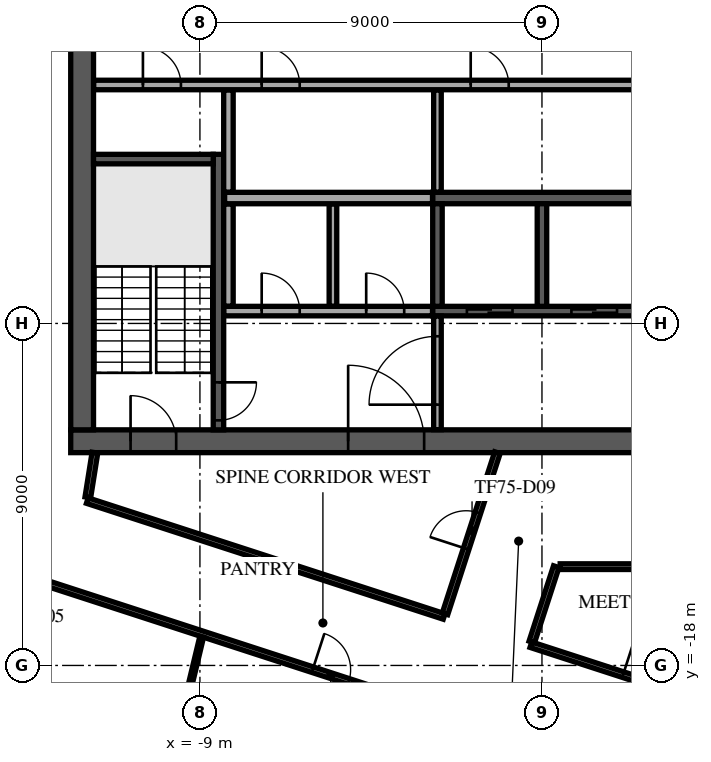
"""IFC4 building model, lengths in metres.
Left out: names, types, materials, properties, quantities, classifications, styles, units other than length and angle.
Written with IfcOpenShell. Run it as: python <this file> out.ifc"""

import sys

from ifc_helpers import new_model, si_unit, direction, frame, frame_2d, origin, place, context, subcontext, project, spatial, rectangle, extrude, element, fill, save


model = new_model("IFC4")
c1 = context("Model", 3, precision=1e-05, world=origin(), true_north=direction((0.0, 1.0)))
c2 = subcontext(c1, "Body", "Model", "MODEL_VIEW")
j1 = project(units=[si_unit("LENGTHUNIT", "METRE"), si_unit("PLANEANGLEUNIT", "RADIAN")], contexts=[c1])
p1 = place(None, origin())
s1 = spatial("IfcSite", under=j1, at=p1, CompositionType="ELEMENT")
p2 = place(p1, origin())
s2 = spatial("IfcBuilding", under=s1, at=p2, CompositionType="ELEMENT")
p3 = place(p2, frame((0.0, 0.0, 316.5)))
s3 = spatial("IfcBuildingStorey", under=s2, at=p3, CompositionType="ELEMENT", Elevation=316.5)
p4 = place(p3, frame((-12.4, -12.1, 0.0), z_axis=(0.0, 0.0, 1.0), x_axis=(1.0, 0.0, 0.0)))
e1 = element("IfcWall", 1, at=p4, inside=s3, PredefinedType="SHEAR", context=c2, shape_type="SweptSolid", body=[
    extrude(rectangle(XDim=24.8, YDim=0.6, at=frame_2d((12.4, 0.0))), origin(), (0.0, 0.0, 1.0), 3.65),
])
p5 = place(p4, frame((7.3, 0.0, 0.0)))
e2 = element("IfcOpeningElement", 2, at=p5, cuts=e1, PredefinedType="OPENING", context=c2, shape_type="SweptSolid", body=[
    extrude(rectangle(XDim=2.0, YDim=2.1, at=frame_2d((1.0, 1.05))), frame((0.0, 0.31, 0.0), z_axis=(0.0, -1.0, 0.0), x_axis=(1.0, 0.0, 0.0)), (0.0, 0.0, 1.0), 0.62),
])
p6 = place(p4, frame((17.425, 0.0, 0.0)))
e3 = element("IfcOpeningElement", 3, at=p6, cuts=e1, PredefinedType="OPENING", context=c2, shape_type="SweptSolid", body=[
    extrude(rectangle(XDim=1.2, YDim=2.1, at=frame_2d((0.6, 1.05))), frame((0.0, 0.31, 0.0), z_axis=(0.0, -1.0, 0.0), x_axis=(1.0, 0.0, 0.0)), (0.0, 0.0, 1.0), 0.62),
])
p7 = place(p4, frame((1.575, 0.0, 0.0)))
e4 = element("IfcOpeningElement", 4, at=p7, cuts=e1, PredefinedType="OPENING", context=c2, shape_type="SweptSolid", body=[
    extrude(rectangle(XDim=1.2, YDim=2.1, at=frame_2d((0.6, 1.05))), frame((0.0, 0.31, 0.0), z_axis=(0.0, -1.0, 0.0), x_axis=(1.0, 0.0, 0.0)), (0.0, 0.0, 1.0), 0.62),
])
p8 = place(p4, frame((22.025, 0.0, 0.0)))
e5 = element("IfcOpeningElement", 5, at=p8, cuts=e1, PredefinedType="OPENING", context=c2, shape_type="SweptSolid", body=[
    extrude(rectangle(XDim=1.2, YDim=2.1, at=frame_2d((0.6, 1.05))), frame((0.0, 0.31, 0.0), z_axis=(0.0, -1.0, 0.0), x_axis=(1.0, 0.0, 0.0)), (0.0, 0.0, 1.0), 0.62),
])
p9 = place(p3, frame((-12.1, -11.8, 0.0), z_axis=(0.0, 0.0, 1.0), x_axis=(0.0, 1.0, 0.0)))
e6 = element("IfcWall", 6, at=p9, inside=s3, PredefinedType="SHEAR", context=c2, shape_type="SweptSolid", body=[
    extrude(rectangle(XDim=23.6, YDim=0.6, at=frame_2d((11.8, 0.0))), origin(), (0.0, 0.0, 1.0), 3.65),
])
p10 = place(p9, frame((10.6, 0.0, 0.0)))
e7 = element("IfcOpeningElement", 7, at=p10, cuts=e6, PredefinedType="OPENING", context=c2, shape_type="SweptSolid", body=[
    extrude(rectangle(XDim=2.4, YDim=2.4, at=frame_2d((1.2, 1.2))), frame((0.0, 0.31, 0.0), z_axis=(0.0, -1.0, 0.0), x_axis=(1.0, 0.0, 0.0)), (0.0, 0.0, 1.0), 0.62),
])
p11 = place(p3, frame((-2.875, -5.7, 0.0), z_axis=(0.0, 0.0, 1.0), x_axis=(1.0, 0.0, 0.0)))
e8 = element("IfcWall", 8, at=p11, inside=s3, PredefinedType="SOLIDWALL", context=c2, shape_type="SweptSolid", body=[
    extrude(rectangle(XDim=11.25, YDim=0.3, at=frame_2d((5.625, 0.0))), origin(), (0.0, 0.0, 1.0), 3.65),
])
p12 = place(p3, frame((-2.875, -8.675, 0.0), z_axis=(0.0, 0.0, 1.0), x_axis=(1.0, 0.0, 0.0)))
e9 = element("IfcWall", 9, at=p12, inside=s3, PredefinedType="SOLIDWALL", context=c2, shape_type="SweptSolid", body=[
    extrude(rectangle(XDim=11.25, YDim=0.25, at=frame_2d((5.625, 0.0))), origin(), (0.0, 0.0, 1.0), 3.65),
])
p13 = place(p12, frame((0.9, 0.0, 0.0)))
e10 = element("IfcOpeningElement", 10, at=p13, cuts=e9, PredefinedType="OPENING", context=c2, shape_type="SweptSolid", body=[
    extrude(rectangle(XDim=1.2, YDim=2.1, at=frame_2d((0.6, 1.05))), frame((0.0, 0.135, 0.0), z_axis=(0.0, -1.0, 0.0), x_axis=(1.0, 0.0, 0.0)), (0.0, 0.0, 1.0), 0.27),
])
p14 = place(p12, frame((3.65, 0.0, 0.0)))
e11 = element("IfcOpeningElement", 11, at=p14, cuts=e9, PredefinedType="OPENING", context=c2, shape_type="SweptSolid", body=[
    extrude(rectangle(XDim=1.2, YDim=2.1, at=frame_2d((0.6, 1.05))), frame((0.0, 0.135, 0.0), z_axis=(0.0, -1.0, 0.0), x_axis=(1.0, 0.0, 0.0)), (0.0, 0.0, 1.0), 0.27),
])
p15 = place(p12, frame((6.4, 0.0, 0.0)))
e12 = element("IfcOpeningElement", 12, at=p15, cuts=e9, PredefinedType="OPENING", context=c2, shape_type="SweptSolid", body=[
    extrude(rectangle(XDim=1.2, YDim=2.1, at=frame_2d((0.6, 1.05))), frame((0.0, 0.135, 0.0), z_axis=(0.0, -1.0, 0.0), x_axis=(1.0, 0.0, 0.0)), (0.0, 0.0, 1.0), 0.27),
])
p16 = place(p12, frame((9.15, 0.0, 0.0)))
e13 = element("IfcOpeningElement", 13, at=p16, cuts=e9, PredefinedType="OPENING", context=c2, shape_type="SweptSolid", body=[
    extrude(rectangle(XDim=1.2, YDim=2.1, at=frame_2d((0.6, 1.05))), frame((0.0, 0.135, 0.0), z_axis=(0.0, -1.0, 0.0), x_axis=(1.0, 0.0, 0.0)), (0.0, 0.0, 1.0), 0.27),
])
for number, where, z_axis, x_axis in (
    (14, (-2.75, -8.55, 0.0), (0.0, 0.0, 1.0), (0.0, 1.0, 0.0)),
    (15, (0.0, -8.55, 0.0), (0.0, 0.0, 1.0), (0.0, 1.0, 0.0)),
):
    element("IfcWall", number, at=place(p3, frame(where, z_axis=z_axis, x_axis=x_axis)), inside=s3, PredefinedType="SOLIDWALL", context=c2, shape_type="SweptSolid", body=[
        extrude(rectangle(XDim=2.7, YDim=0.25, at=frame_2d((1.35, 0.0))), origin(), (0.0, 0.0, 1.0), 3.65),
    ])
p17 = place(p3, frame((-8.512, -4.55, 0.0), z_axis=(0.0, 0.0, 1.0), x_axis=(0.0, -1.0, 0.0)))
e16 = element("IfcWall", 16, at=p17, inside=s3, PredefinedType="SOLIDWALL", context=c2, shape_type="SweptSolid", body=[
    extrude(rectangle(XDim=7.25, YDim=0.275, at=frame_2d((3.625, 0.0))), origin(), (0.0, 0.0, 1.0), 3.65),
])
p18 = place(p17, frame((6.0, 0.0, 0.0)))
e17 = element("IfcOpeningElement", 17, at=p18, cuts=e16, PredefinedType="OPENING", context=c2, shape_type="SweptSolid", body=[
    extrude(rectangle(XDim=1.0, YDim=2.1, at=frame_2d((0.5, 1.05))), frame((0.0, 0.147, 0.0), z_axis=(0.0, -1.0, 0.0), x_axis=(1.0, 0.0, 0.0)), (0.0, 0.0, 1.0), 0.295),
])
p19 = place(p3, frame((-8.65, -4.675, 0.0), z_axis=(0.0, 0.0, 1.0), x_axis=(-1.0, 0.0, 0.0)))
e18 = element("IfcWall", 18, at=p19, inside=s3, PredefinedType="SOLIDWALL", context=c2, shape_type="SweptSolid", body=[
    extrude(rectangle(XDim=3.15, YDim=0.25, at=frame_2d((1.575, 0.0))), origin(), (0.0, 0.0, 1.0), 3.65),
])
p20 = place(p3, frame((-2.75, -11.795, 0.0), z_axis=(0.0, 0.0, 1.0), x_axis=(0.0, 1.0, 0.0)))
e19 = element("IfcWall", 19, at=p20, inside=s3, PredefinedType="PARTITIONING", context=c2, shape_type="SweptSolid", body=[
    extrude(rectangle(XDim=2.99, YDim=0.2, at=frame_2d((1.495, 0.0))), origin(), (0.0, 0.0, 1.0), 3.65),
])
p21 = place(p20, frame((0.657, 0.0, 0.0)))
e20 = element("IfcOpeningElement", 20, at=p21, cuts=e19, PredefinedType="OPENING", context=c2, shape_type="SweptSolid", body=[
    extrude(rectangle(XDim=1.8, YDim=2.1, at=frame_2d((0.9, 1.05))), frame((0.0, 0.11, 0.0), z_axis=(0.0, -1.0, 0.0), x_axis=(1.0, 0.0, 0.0)), (0.0, 0.0, 1.0), 0.22),
])
p22 = place(p3, frame((-8.37, -8.675, 0.0), z_axis=(0.0, 0.0, 1.0), x_axis=(1.0, 0.0, 0.0)))
e21 = element("IfcWall", 21, at=p22, inside=s3, PredefinedType="PARTITIONING", context=c2, shape_type="SweptSolid", body=[
    extrude(rectangle(XDim=5.49, YDim=0.25, at=frame_2d((2.745, 0.0))), origin(), (0.0, 0.0, 1.0), 3.65),
])
p23 = place(p22, frame((0.995, 0.0, 0.0)))
e22 = element("IfcOpeningElement", 22, at=p23, cuts=e21, PredefinedType="OPENING", context=c2, shape_type="SweptSolid", body=[
    extrude(rectangle(XDim=1.0, YDim=2.1, at=frame_2d((0.5, 1.05))), frame((0.0, 0.135, 0.0), z_axis=(0.0, -1.0, 0.0), x_axis=(1.0, 0.0, 0.0)), (0.0, 0.0, 1.0), 0.27),
])
p24 = place(p22, frame((3.745, 0.0, 0.0)))
e23 = element("IfcOpeningElement", 23, at=p24, cuts=e21, PredefinedType="OPENING", context=c2, shape_type="SweptSolid", body=[
    extrude(rectangle(XDim=1.0, YDim=2.1, at=frame_2d((0.5, 1.05))), frame((0.0, 0.135, 0.0), z_axis=(0.0, -1.0, 0.0), x_axis=(1.0, 0.0, 0.0)), (0.0, 0.0, 1.0), 0.27),
])
p25 = place(p3, frame((-8.25, -8.545, 0.0), z_axis=(0.0, 0.0, 1.0), x_axis=(0.0, 1.0, 0.0)))
e24 = element("IfcWall", 24, at=p25, inside=s3, PredefinedType="PARTITIONING", context=c2, shape_type="SweptSolid", body=[
    extrude(rectangle(XDim=2.69, YDim=0.25, at=frame_2d((1.345, 0.0))), origin(), (0.0, 0.0, 1.0), 3.65),
])
p26 = place(p3, frame((-5.5, -8.545, 0.0), z_axis=(0.0, 0.0, 1.0), x_axis=(0.0, 1.0, 0.0)))
e25 = element("IfcWall", 25, at=p26, inside=s3, PredefinedType="PARTITIONING", context=c2, shape_type="SweptSolid", body=[
    extrude(rectangle(XDim=2.69, YDim=0.2, at=frame_2d((1.345, 0.0))), origin(), (0.0, 0.0, 1.0), 3.65),
])
p27 = place(p3, frame((-8.35, -5.7, 0.0), z_axis=(0.0, 0.0, 1.0), x_axis=(1.0, 0.0, 0.0)))
e26 = element("IfcWall", 26, at=p27, inside=s3, PredefinedType="PARTITIONING", context=c2, shape_type="SweptSolid", body=[
    extrude(rectangle(XDim=5.47, YDim=0.3, at=frame_2d((2.735, 0.0))), origin(), (0.0, 0.0, 1.0), 3.65),
])
p28 = place(p3, frame((-8.25, -5.545, 0.0), z_axis=(0.0, 0.0, 1.0), x_axis=(0.0, 1.0, 0.0)))
e27 = element("IfcWall", 27, at=p28, inside=s3, PredefinedType="PARTITIONING", context=c2, shape_type="SweptSolid", body=[
    extrude(rectangle(XDim=2.69, YDim=0.25, at=frame_2d((1.345, 0.0))), origin(), (0.0, 0.0, 1.0), 3.65),
])
p29 = place(p3, frame((-2.75, -5.545, 0.0), z_axis=(0.0, 0.0, 1.0), x_axis=(0.0, 1.0, 0.0)))
e28 = element("IfcWall", 28, at=p29, inside=s3, PredefinedType="PARTITIONING", context=c2, shape_type="SweptSolid", body=[
    extrude(rectangle(XDim=2.69, YDim=0.2, at=frame_2d((1.345, 0.0))), origin(), (0.0, 0.0, 1.0), 3.65),
])
p30 = place(p3, frame((-11.795, -2.725, 0.0), z_axis=(0.0, 0.0, 1.0), x_axis=(1.0, 0.0, 0.0)))
e29 = element("IfcWall", 29, at=p30, inside=s3, PredefinedType="PARTITIONING", context=c2, shape_type="SweptSolid", body=[
    extrude(rectangle(XDim=14.415, YDim=0.25, at=frame_2d((7.208, 0.0))), origin(), (0.0, 0.0, 1.0), 3.65),
])
p31 = place(p30, frame((1.295, 0.0, 0.0)))
e30 = element("IfcOpeningElement", 30, at=p31, cuts=e29, PredefinedType="OPENING", context=c2, shape_type="SweptSolid", body=[
    extrude(rectangle(XDim=1.0, YDim=2.1, at=frame_2d((0.5, 1.05))), frame((0.0, 0.135, 0.0), z_axis=(0.0, -1.0, 0.0), x_axis=(1.0, 0.0, 0.0)), (0.0, 0.0, 1.0), 0.27),
])
p32 = place(p30, frame((4.42, 0.0, 0.0)))
e31 = element("IfcOpeningElement", 31, at=p32, cuts=e29, PredefinedType="OPENING", context=c2, shape_type="SweptSolid", body=[
    extrude(rectangle(XDim=1.0, YDim=2.1, at=frame_2d((0.5, 1.05))), frame((0.0, 0.135, 0.0), z_axis=(0.0, -1.0, 0.0), x_axis=(1.0, 0.0, 0.0)), (0.0, 0.0, 1.0), 0.27),
])
p33 = place(p30, frame((9.92, 0.0, 0.0)))
e32 = element("IfcOpeningElement", 32, at=p33, cuts=e29, PredefinedType="OPENING", context=c2, shape_type="SweptSolid", body=[
    extrude(rectangle(XDim=1.0, YDim=2.1, at=frame_2d((0.5, 1.05))), frame((0.0, 0.135, 0.0), z_axis=(0.0, -1.0, 0.0), x_axis=(1.0, 0.0, 0.0)), (0.0, 0.0, 1.0), 0.27),
])
p34 = place(p3, frame((-22.763, -12.676, 0.0), z_axis=(0.0, 0.0, 1.0), x_axis=(0.951055018443, -0.309021604252, 0.0)))
e33 = element("IfcWall", 33, at=p34, inside=s3, PredefinedType="PARTITIONING", context=c2, shape_type="SweptSolid", body=[
    extrude(rectangle(XDim=35.537, YDim=0.15, at=frame_2d((17.769, 0.0))), origin(), (0.0, 0.0, 1.0), 3.25),
])
p35 = place(p34, frame((0.8, 0.0, 0.0)))
e34 = element("IfcOpeningElement", 34, at=p35, cuts=e33, PredefinedType="OPENING", context=c2, shape_type="SweptSolid", body=[
    extrude(rectangle(XDim=1.8, YDim=2.1, at=frame_2d((0.9, 1.05))), frame((0.0, 0.085, 0.0), z_axis=(0.0, -1.0, 0.0), x_axis=(1.0, 0.0, 0.0)), (0.0, 0.0, 1.0), 0.17),
])
p36 = place(p34, frame((9.098, 0.0, 0.0)))
e35 = element("IfcOpeningElement", 35, at=p36, cuts=e33, PredefinedType="OPENING", context=c2, shape_type="SweptSolid", body=[
    extrude(rectangle(XDim=1.0, YDim=2.1, at=frame_2d((0.5, 1.05))), frame((0.0, 0.085, 0.0), z_axis=(0.0, -1.0, 0.0), x_axis=(1.0, 0.0, 0.0)), (0.0, 0.0, 1.0), 0.17),
])
p37 = place(p34, frame((17.589, 0.0, 0.0)))
e36 = element("IfcOpeningElement", 36, at=p37, cuts=e33, PredefinedType="OPENING", context=c2, shape_type="SweptSolid", body=[
    extrude(rectangle(XDim=1.0, YDim=2.1, at=frame_2d((0.5, 1.05))), frame((0.0, 0.085, 0.0), z_axis=(0.0, -1.0, 0.0), x_axis=(1.0, 0.0, 0.0)), (0.0, 0.0, 1.0), 0.17),
])
p38 = place(p34, frame((27.473, 0.0, 0.0)))
e37 = element("IfcOpeningElement", 37, at=p38, cuts=e33, PredefinedType="OPENING", context=c2, shape_type="SweptSolid", body=[
    extrude(rectangle(XDim=1.0, YDim=2.1, at=frame_2d((0.5, 1.05))), frame((0.0, 0.085, 0.0), z_axis=(0.0, -1.0, 0.0), x_axis=(1.0, 0.0, 0.0)), (0.0, 0.0, 1.0), 0.17),
])
p39 = place(p34, frame((30.83, 0.0, 0.0)))
e38 = element("IfcOpeningElement", 38, at=p39, cuts=e33, PredefinedType="OPENING", context=c2, shape_type="SweptSolid", body=[
    extrude(rectangle(XDim=1.8, YDim=2.1, at=frame_2d((0.9, 1.05))), frame((0.0, 0.085, 0.0), z_axis=(0.0, -1.0, 0.0), x_axis=(1.0, 0.0, 0.0)), (0.0, 0.0, 1.0), 0.17),
])
p40 = place(p3, frame((-11.963, -13.662, 0.0), z_axis=(0.0, 0.0, 1.0), x_axis=(0.951081492471, -0.308940115036, 0.0)))
e39 = element("IfcWall", 39, at=p40, inside=s3, PredefinedType="PARTITIONING", context=c2, shape_type="SweptSolid", body=[
    extrude(rectangle(XDim=9.872, YDim=0.15, at=frame_2d((4.936, 0.0))), origin(), (0.0, 0.0, 1.0), 3.25),
])
p41 = place(p3, frame((-11.949, -13.575, 0.0), z_axis=(0.0, 0.0, 1.0), x_axis=(0.156542003239, 0.987671302216, 0.0)))
e40 = element("IfcWall", 40, at=p41, inside=s3, PredefinedType="PARTITIONING", context=c2, shape_type="SweptSolid", body=[
    extrude(rectangle(XDim=1.19, YDim=0.15, at=frame_2d((0.595, 0.0))), origin(), (0.0, 0.0, 1.0), 3.25),
])
p42 = place(p3, frame((-2.551, -16.641, 0.0), z_axis=(0.0, 0.0, 1.0), x_axis=(0.309172730038, 0.951005900613, 0.0)))
e41 = element("IfcWall", 41, at=p42, inside=s3, PredefinedType="PARTITIONING", context=c2, shape_type="SweptSolid", body=[
    extrude(rectangle(XDim=4.459, YDim=0.15, at=frame_2d((2.229, 0.0))), origin(), (0.0, 0.0, 1.0), 3.25),
])
p43 = place(p42, frame((1.8, 0.0, 0.0)))
e42 = element("IfcOpeningElement", 42, at=p43, cuts=e41, PredefinedType="OPENING", context=c2, shape_type="SweptSolid", body=[
    extrude(rectangle(XDim=1.0, YDim=2.1, at=frame_2d((0.5, 1.05))), frame((0.0, 0.085, 0.0), z_axis=(0.0, -1.0, 0.0), x_axis=(1.0, 0.0, 0.0)), (0.0, 0.0, 1.0), 0.17),
])
p44 = place(p3, frame((-0.291, -17.454, 0.0), z_axis=(0.0, 0.0, 1.0), x_axis=(0.951062767237, -0.308997755292, 0.0)))
e43 = element("IfcWall", 43, at=p44, inside=s3, PredefinedType="PARTITIONING", context=c2, shape_type="SweptSolid", body=[
    extrude(rectangle(XDim=12.689, YDim=0.15, at=frame_2d((6.344, 0.0))), origin(), (0.0, 0.0, 1.0), 3.25),
])
p45 = place(p44, frame((2.55, 0.0, 0.0)))
e44 = element("IfcOpeningElement", 44, at=p45, cuts=e43, PredefinedType="OPENING", context=c2, shape_type="SweptSolid", body=[
    extrude(rectangle(XDim=1.0, YDim=2.1, at=frame_2d((0.5, 1.05))), frame((0.0, 0.085, 0.0), z_axis=(0.0, -1.0, 0.0), x_axis=(1.0, 0.0, 0.0)), (0.0, 0.0, 1.0), 0.17),
])
p46 = place(p3, frame((-0.268, -17.383, 0.0), z_axis=(0.0, 0.0, 1.0), x_axis=(0.308805378048, 0.951125248581, 0.0)))
e45 = element("IfcWall", 45, at=p46, inside=s3, PredefinedType="PARTITIONING", context=c2, shape_type="SweptSolid", body=[
    extrude(rectangle(XDim=2.085, YDim=0.15, at=frame_2d((1.042, 0.0))), origin(), (0.0, 0.0, 1.0), 3.65),
])
p47 = place(p3, frame((0.479, -15.4, 0.0), z_axis=(0.0, 0.0, 1.0), x_axis=(1.0, 0.0, 0.0)))
e46 = element("IfcWall", 46, at=p47, inside=s3, PredefinedType="PARTITIONING", context=c2, shape_type="SweptSolid", body=[
    extrude(rectangle(XDim=14.921, YDim=0.15, at=frame_2d((7.46, 0.0))), origin(), (0.0, 0.0, 1.0), 3.25),
])
p48 = place(p3, frame((-11.347, -27.224, 0.0), z_axis=(0.0, 0.0, 1.0), x_axis=(0.233270362444, 0.972411917865, 0.0)))
e47 = element("IfcWall", 47, at=p48, inside=s3, PredefinedType="PARTITIONING", context=c2, shape_type="SweptSolid", body=[
    extrude(rectangle(XDim=10.261, YDim=0.1, at=frame_2d((5.13, 0.0))), origin(), (0.0, 0.0, 1.0), 3.05),
])
p49 = place(p5, origin())
e48 = element("IfcDoor", 48, at=p49, inside=s3, OperationType="SINGLE_SWING_LEFT", PredefinedType="DOOR", context=c2, shape_type="SweptSolid", body=[
    extrude(rectangle(XDim=2.0, YDim=2.1, at=frame_2d((1.0, 1.05))), frame((0.0, 0.025, 0.0), z_axis=(0.0, -1.0, 0.0), x_axis=(1.0, 0.0, 0.0)), (0.0, 0.0, 1.0), 0.05),
])
fill(e2, e48)
p50 = place(p7, origin())
e49 = element("IfcDoor", 49, at=p50, inside=s3, OperationType="SINGLE_SWING_LEFT", PredefinedType="DOOR", context=c2, shape_type="SweptSolid", body=[
    extrude(rectangle(XDim=1.2, YDim=2.1, at=frame_2d((0.6, 1.05))), frame((0.0, 0.025, 0.0), z_axis=(0.0, -1.0, 0.0), x_axis=(1.0, 0.0, 0.0)), (0.0, 0.0, 1.0), 0.05),
])
fill(e4, e49)
p51 = place(p13, origin())
e50 = element("IfcDoor", 50, at=p51, inside=s3, OperationType="DOUBLE_DOOR_SLIDING", PredefinedType="DOOR", context=c2, shape_type="SweptSolid", body=[
    extrude(rectangle(XDim=1.2, YDim=2.1, at=frame_2d((0.6, 1.05))), frame((0.0, 0.025, 0.0), z_axis=(0.0, -1.0, 0.0), x_axis=(1.0, 0.0, 0.0)), (0.0, 0.0, 1.0), 0.05),
])
fill(e10, e50)
p52 = place(p14, origin())
e51 = element("IfcDoor", 51, at=p52, inside=s3, OperationType="DOUBLE_DOOR_SLIDING", PredefinedType="DOOR", context=c2, shape_type="SweptSolid", body=[
    extrude(rectangle(XDim=1.2, YDim=2.1, at=frame_2d((0.6, 1.05))), frame((0.0, 0.025, 0.0), z_axis=(0.0, -1.0, 0.0), x_axis=(1.0, 0.0, 0.0)), (0.0, 0.0, 1.0), 0.05),
])
fill(e11, e51)
p53 = place(p18, origin())
e52 = element("IfcDoor", 52, at=p53, inside=s3, OperationType="SINGLE_SWING_LEFT", PredefinedType="DOOR", context=c2, shape_type="SweptSolid", body=[
    extrude(rectangle(XDim=1.0, YDim=2.1, at=frame_2d((0.5, 1.05))), frame((0.0, 0.025, 0.0), z_axis=(0.0, -1.0, 0.0), x_axis=(1.0, 0.0, 0.0)), (0.0, 0.0, 1.0), 0.05),
])
fill(e17, e52)
p54 = place(p23, origin())
e53 = element("IfcDoor", 53, at=p54, inside=s3, OperationType="SINGLE_SWING_RIGHT", PredefinedType="DOOR", context=c2, shape_type="SweptSolid", body=[
    extrude(rectangle(XDim=1.0, YDim=2.1, at=frame_2d((0.5, 1.05))), frame((0.0, 0.025, 0.0), z_axis=(0.0, -1.0, 0.0), x_axis=(1.0, 0.0, 0.0)), (0.0, 0.0, 1.0), 0.05),
])
fill(e22, e53)
p55 = place(p24, origin())
e54 = element("IfcDoor", 54, at=p55, inside=s3, OperationType="SINGLE_SWING_RIGHT", PredefinedType="DOOR", context=c2, shape_type="SweptSolid", body=[
    extrude(rectangle(XDim=1.0, YDim=2.1, at=frame_2d((0.5, 1.05))), frame((0.0, 0.025, 0.0), z_axis=(0.0, -1.0, 0.0), x_axis=(1.0, 0.0, 0.0)), (0.0, 0.0, 1.0), 0.05),
])
fill(e23, e54)
p56 = place(p31, origin())
e55 = element("IfcDoor", 55, at=p56, inside=s3, OperationType="SINGLE_SWING_RIGHT", PredefinedType="DOOR", context=c2, shape_type="SweptSolid", body=[
    extrude(rectangle(XDim=1.0, YDim=2.1, at=frame_2d((0.5, 1.05))), frame((0.0, 0.025, 0.0), z_axis=(0.0, -1.0, 0.0), x_axis=(1.0, 0.0, 0.0)), (0.0, 0.0, 1.0), 0.05),
])
fill(e30, e55)
p57 = place(p32, origin())
e56 = element("IfcDoor", 56, at=p57, inside=s3, OperationType="SINGLE_SWING_RIGHT", PredefinedType="DOOR", context=c2, shape_type="SweptSolid", body=[
    extrude(rectangle(XDim=1.0, YDim=2.1, at=frame_2d((0.5, 1.05))), frame((0.0, 0.025, 0.0), z_axis=(0.0, -1.0, 0.0), x_axis=(1.0, 0.0, 0.0)), (0.0, 0.0, 1.0), 0.05),
])
fill(e31, e56)
p58 = place(p33, origin())
e57 = element("IfcDoor", 57, at=p58, inside=s3, OperationType="SINGLE_SWING_RIGHT", PredefinedType="DOOR", context=c2, shape_type="SweptSolid", body=[
    extrude(rectangle(XDim=1.0, YDim=2.1, at=frame_2d((0.5, 1.05))), frame((0.0, 0.025, 0.0), z_axis=(0.0, -1.0, 0.0), x_axis=(1.0, 0.0, 0.0)), (0.0, 0.0, 1.0), 0.05),
])
fill(e32, e57)
p59 = place(p21, origin())
e58 = element("IfcDoor", 58, at=p59, inside=s3, OperationType="SINGLE_SWING_LEFT", PredefinedType="DOOR", context=c2, shape_type="SweptSolid", body=[
    extrude(rectangle(XDim=1.8, YDim=2.1, at=frame_2d((0.9, 1.05))), frame((0.0, 0.025, 0.0), z_axis=(0.0, -1.0, 0.0), x_axis=(1.0, 0.0, 0.0)), (0.0, 0.0, 1.0), 0.05),
])
fill(e20, e58)
p60 = place(p37, frame((1.0, 0.0, 0.0), z_axis=(0.0, 0.0, 1.0), x_axis=(-1.0, 0.0, 0.0)))
e59 = element("IfcDoor", 59, at=p60, inside=s3, OperationType="SINGLE_SWING_RIGHT", PredefinedType="DOOR", context=c2, shape_type="SweptSolid", body=[
    extrude(rectangle(XDim=1.0, YDim=2.1, at=frame_2d((0.5, 1.05))), frame((0.0, 0.025, 0.0), z_axis=(0.0, -1.0, 0.0), x_axis=(1.0, 0.0, 0.0)), (0.0, 0.0, 1.0), 0.05),
])
fill(e36, e59)
p61 = place(p43, origin())
e60 = element("IfcDoor", 60, at=p61, inside=s3, OperationType="SINGLE_SWING_LEFT", PredefinedType="DOOR", context=c2, shape_type="SweptSolid", body=[
    extrude(rectangle(XDim=1.0, YDim=2.1, at=frame_2d((0.5, 1.05))), frame((0.0, 0.025, 0.0), z_axis=(0.0, -1.0, 0.0), x_axis=(1.0, 0.0, 0.0)), (0.0, 0.0, 1.0), 0.05),
])
fill(e42, e60)
p62 = place(p45, origin())
e61 = element("IfcDoor", 61, at=p62, inside=s3, OperationType="SINGLE_SWING_RIGHT", PredefinedType="DOOR", context=c2, shape_type="SweptSolid", body=[
    extrude(rectangle(XDim=1.0, YDim=2.1, at=frame_2d((0.5, 1.05))), frame((0.0, 0.025, 0.0), z_axis=(0.0, -1.0, 0.0), x_axis=(1.0, 0.0, 0.0)), (0.0, 0.0, 1.0), 0.05),
])
fill(e44, e61)
save(model, sys.argv[1])
